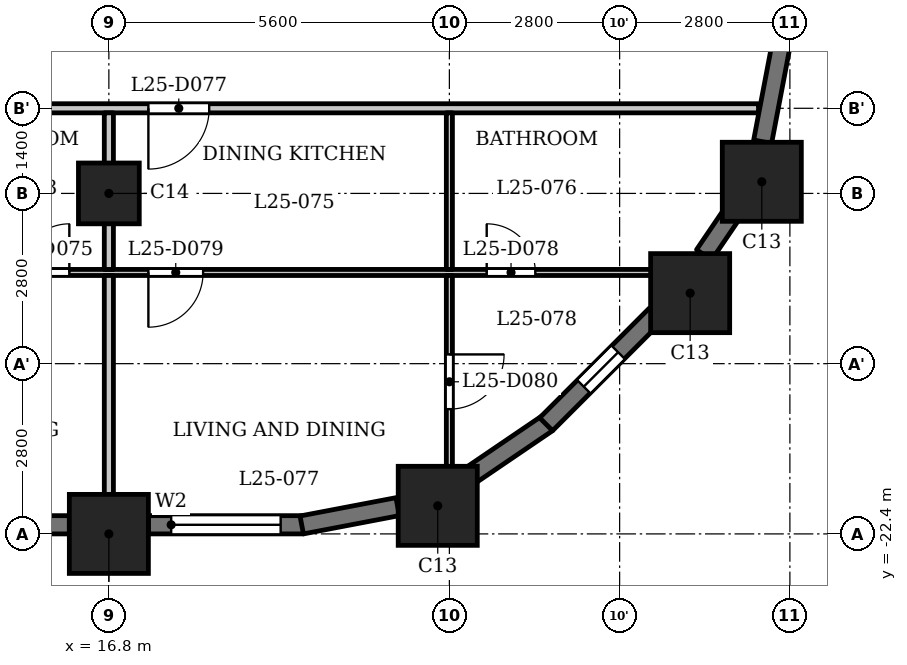
"""IFC4 building model, lengths in metres.
Left out: names, types, materials, properties, quantities, classifications, styles, units other than length and angle.
Written with IfcOpenShell. Run it as: python <this file> out.ifc"""

import sys

from ifc_helpers import new_model, si_unit, direction, frame, frame_2d, origin, origin_2d, place, context, subcontext, project, spatial, rectangle, extrude, element, fill, save


model = new_model("IFC4")
c1 = context("Model", 3, precision=1e-05, world=origin(), true_north=direction((0.0, 1.0)))
c2 = subcontext(c1, "Body", "Model", "MODEL_VIEW")
j1 = project(units=[si_unit("LENGTHUNIT", "METRE"), si_unit("PLANEANGLEUNIT", "RADIAN")], contexts=[c1])
p1 = place(None, origin())
s1 = spatial("IfcSite", under=j1, at=p1, CompositionType="ELEMENT")
p2 = place(p1, origin())
s2 = spatial("IfcBuilding", under=s1, at=p2, CompositionType="ELEMENT")
p3 = place(p2, frame((0.0, 0.0, 100.8)))
s3 = spatial("IfcBuildingStorey", under=s2, at=p3, CompositionType="ELEMENT", Elevation=100.8)
for number, where, z_axis, x_axis in (
    (1, (16.8, -22.4, 0.0), (0.0, 0.0, 1.0), (1.0, 0.0, 0.0)),
    (2, (22.209, -21.938, 0.0), (0.0, 0.0, 1.0), (1.0, 0.0, 0.0)),
    (3, (26.36, -18.44, 0.0), (0.0, 0.0, 1.0), (1.0, 0.0, 0.0)),
    (4, (27.538, -16.609, 0.0), (0.0, 0.0, 1.0), (1.0, 0.0, 0.0)),
):
    element("IfcColumn", number, at=place(p3, frame(where, z_axis=z_axis, x_axis=x_axis)), inside=s3, PredefinedType="COLUMN", context=c2, shape_type="SweptSolid", body=[
        extrude(rectangle(XDim=1.3, YDim=1.3, at=origin_2d()), origin(), (0.0, 0.0, 1.0), 3.5),
    ])
p4 = place(p3, frame((16.8, -16.8, 0.0), z_axis=(0.0, 0.0, 1.0), x_axis=(1.0, 0.0, 0.0)))
e5 = element("IfcColumn", 5, at=p4, inside=s3, PredefinedType="COLUMN", context=c2, shape_type="SweptSolid", body=[
    extrude(rectangle(XDim=1.0, YDim=1.0, at=origin_2d()), origin(), (0.0, 0.0, 1.0), 3.5),
])
p5 = place(p3, frame((11.85, -22.25, 0.0), z_axis=(0.0, 0.0, 1.0), x_axis=(1.0, 0.0, 0.0)))
e6 = element("IfcWall", 6, at=p5, inside=s3, PredefinedType="SOLIDWALL", context=c2, shape_type="SweptSolid", body=[
    extrude(rectangle(XDim=4.3, YDim=0.3, at=frame_2d((2.15, 0.0))), origin(), (0.0, 0.0, 1.0), 2.4),
])
p6 = place(p5, frame((0.35, 0.0, 1.2)))
e7 = element("IfcOpeningElement", 7, at=p6, cuts=e6, PredefinedType="OPENING", context=c2, shape_type="SweptSolid", body=[
    extrude(rectangle(XDim=3.6, YDim=0.95, at=frame_2d((1.8, 0.475))), frame((0.0, 0.16, 0.0), z_axis=(0.0, -1.0, 0.0), x_axis=(1.0, 0.0, 0.0)), (0.0, 0.0, 1.0), 0.32),
])
p7 = place(p3, frame((17.45, -22.25, 0.0), z_axis=(0.0, 0.0, 1.0), x_axis=(1.0, 0.0, 0.0)))
e8 = element("IfcWall", 8, at=p7, inside=s3, PredefinedType="SOLIDWALL", context=c2, shape_type="SweptSolid", body=[
    extrude(rectangle(XDim=2.55, YDim=0.3, at=frame_2d((1.275, 0.0))), origin(), (0.0, 0.0, 1.0), 2.4),
])
p8 = place(p7, frame((0.375, 0.0, 0.9)))
e9 = element("IfcOpeningElement", 9, at=p8, cuts=e8, PredefinedType="OPENING", context=c2, shape_type="SweptSolid", body=[
    extrude(rectangle(XDim=1.8, YDim=1.25, at=frame_2d((0.9, 0.625))), frame((0.0, 0.16, 0.0), z_axis=(0.0, -1.0, 0.0), x_axis=(1.0, 0.0, 0.0)), (0.0, 0.0, 1.0), 0.32),
])
for number, where, z_axis, x_axis in (
    (10, (19.972, -22.253, 0.0), (0.0, 0.0, 1.0), (0.982, 0.187, 0.0)),
    (11, (22.684, -21.482, 0.0), (0.0, 0.0, 1.0), (0.827, 0.562, 0.0)),
):
    element("IfcWall", number, at=place(p3, frame(where, z_axis=z_axis, x_axis=x_axis)), inside=s3, PredefinedType="SOLIDWALL", context=c2, shape_type="SweptSolid", body=[
        extrude(rectangle(XDim=1.606, YDim=0.3, at=frame_2d((0.803, 0.0))), origin(), (0.0, 0.0, 1.0), 2.4),
    ])
p9 = place(p3, frame((23.991, -20.597, 0.0), z_axis=(0.0, 0.0, 1.0), x_axis=(0.707106781187, 0.707106781187, 0.0)))
e12 = element("IfcWall", 12, at=p9, inside=s3, PredefinedType="SOLIDWALL", context=c2, shape_type="SweptSolid", body=[
    extrude(rectangle(XDim=2.55, YDim=0.3, at=frame_2d((1.275, 0.0))), origin(), (0.0, 0.0, 1.0), 2.4),
])
p10 = place(p9, frame((0.875, 0.0, 0.6)))
e13 = element("IfcOpeningElement", 13, at=p10, cuts=e12, PredefinedType="OPENING", context=c2, shape_type="SweptSolid", body=[
    extrude(rectangle(XDim=0.8, YDim=1.55, at=frame_2d((0.4, 0.775))), frame((0.0, 0.16, 0.0), z_axis=(0.0, -1.0, 0.0), x_axis=(1.0, 0.0, 0.0)), (0.0, 0.0, 1.0), 0.32),
])
p11 = place(p3, frame((26.589, -17.81, 0.0), z_axis=(0.0, 0.0, 1.0), x_axis=(0.562066330934, 0.827092159091, 0.0)))
e14 = element("IfcWall", 14, at=p11, inside=s3, PredefinedType="SOLIDWALL", context=c2, shape_type="SweptSolid", body=[
    extrude(rectangle(XDim=0.877, YDim=0.3, at=frame_2d((0.438, 0.0))), origin(), (0.0, 0.0, 1.0), 3.2),
])
p12 = place(p3, frame((27.552, -15.949, 0.0), z_axis=(0.0, 0.0, 1.0), x_axis=(0.187279751651, 0.982306619453, 0.0)))
e15 = element("IfcWall", 15, at=p12, inside=s3, PredefinedType="SOLIDWALL", context=c2, shape_type="SweptSolid", body=[
    extrude(rectangle(XDim=1.606, YDim=0.3, at=frame_2d((0.803, 0.0))), origin(), (0.0, 0.0, 1.0), 2.4),
])
p13 = place(p3, frame((-26.19, -18.1, 0.0), z_axis=(0.0, 0.0, 1.0), x_axis=(1.0, 0.0, 0.0)))
e16 = element("IfcWall", 16, at=p13, inside=s3, PredefinedType="PARTITIONING", context=c2, shape_type="SweptSolid", body=[
    extrude(rectangle(XDim=52.63, YDim=0.1, at=frame_2d((26.315, 0.0))), origin(), (0.0, 0.0, 1.0), 3.2),
])
p14 = place(p13, frame((1.09, 0.0, 0.0)))
e17 = element("IfcOpeningElement", 17, at=p14, cuts=e16, PredefinedType="OPENING", context=c2, shape_type="SweptSolid", body=[
    extrude(rectangle(XDim=0.8, YDim=2.1, at=frame_2d((0.4, 1.05))), frame((0.0, 0.06, 0.0), z_axis=(0.0, -1.0, 0.0), x_axis=(1.0, 0.0, 0.0)), (0.0, 0.0, 1.0), 0.12),
])
p15 = place(p13, frame((4.44, 0.0, 0.0)))
e18 = element("IfcOpeningElement", 18, at=p15, cuts=e16, PredefinedType="OPENING", context=c2, shape_type="SweptSolid", body=[
    extrude(rectangle(XDim=0.9, YDim=2.1, at=frame_2d((0.45, 1.05))), frame((0.0, 0.06, 0.0), z_axis=(0.0, -1.0, 0.0), x_axis=(1.0, 0.0, 0.0)), (0.0, 0.0, 1.0), 0.12),
])
p16 = place(p13, frame((10.04, 0.0, 0.0)))
e19 = element("IfcOpeningElement", 19, at=p16, cuts=e16, PredefinedType="OPENING", context=c2, shape_type="SweptSolid", body=[
    extrude(rectangle(XDim=0.8, YDim=2.1, at=frame_2d((0.4, 1.05))), frame((0.0, 0.06, 0.0), z_axis=(0.0, -1.0, 0.0), x_axis=(1.0, 0.0, 0.0)), (0.0, 0.0, 1.0), 0.12),
])
p17 = place(p13, frame((15.64, 0.0, 0.0)))
e20 = element("IfcOpeningElement", 20, at=p17, cuts=e16, PredefinedType="OPENING", context=c2, shape_type="SweptSolid", body=[
    extrude(rectangle(XDim=0.9, YDim=2.1, at=frame_2d((0.45, 1.05))), frame((0.0, 0.06, 0.0), z_axis=(0.0, -1.0, 0.0), x_axis=(1.0, 0.0, 0.0)), (0.0, 0.0, 1.0), 0.12),
])
p18 = place(p13, frame((24.74, 0.0, 0.0)))
e21 = element("IfcOpeningElement", 21, at=p18, cuts=e16, PredefinedType="OPENING", context=c2, shape_type="SweptSolid", body=[
    extrude(rectangle(XDim=0.8, YDim=2.1, at=frame_2d((0.4, 1.05))), frame((0.0, 0.06, 0.0), z_axis=(0.0, -1.0, 0.0), x_axis=(1.0, 0.0, 0.0)), (0.0, 0.0, 1.0), 0.12),
])
p19 = place(p13, frame((21.24, 0.0, 0.0)))
e22 = element("IfcOpeningElement", 22, at=p19, cuts=e16, PredefinedType="OPENING", context=c2, shape_type="SweptSolid", body=[
    extrude(rectangle(XDim=0.9, YDim=2.1, at=frame_2d((0.45, 1.05))), frame((0.0, 0.06, 0.0), z_axis=(0.0, -1.0, 0.0), x_axis=(1.0, 0.0, 0.0)), (0.0, 0.0, 1.0), 0.12),
])
p20 = place(p13, frame((35.94, 0.0, 0.0)))
e23 = element("IfcOpeningElement", 23, at=p20, cuts=e16, PredefinedType="OPENING", context=c2, shape_type="SweptSolid", body=[
    extrude(rectangle(XDim=0.8, YDim=2.1, at=frame_2d((0.4, 1.05))), frame((0.0, 0.06, 0.0), z_axis=(0.0, -1.0, 0.0), x_axis=(1.0, 0.0, 0.0)), (0.0, 0.0, 1.0), 0.12),
])
p21 = place(p13, frame((33.19, 0.0, 0.0)))
e24 = element("IfcOpeningElement", 24, at=p21, cuts=e16, PredefinedType="OPENING", context=c2, shape_type="SweptSolid", body=[
    extrude(rectangle(XDim=0.9, YDim=2.1, at=frame_2d((0.45, 1.05))), frame((0.0, 0.06, 0.0), z_axis=(0.0, -1.0, 0.0), x_axis=(1.0, 0.0, 0.0)), (0.0, 0.0, 1.0), 0.12),
])
p22 = place(p13, frame((27.59, 0.0, 0.0)))
e25 = element("IfcOpeningElement", 25, at=p22, cuts=e16, PredefinedType="OPENING", context=c2, shape_type="SweptSolid", body=[
    extrude(rectangle(XDim=0.9, YDim=2.1, at=frame_2d((0.45, 1.05))), frame((0.0, 0.06, 0.0), z_axis=(0.0, -1.0, 0.0), x_axis=(1.0, 0.0, 0.0)), (0.0, 0.0, 1.0), 0.12),
])
p23 = place(p13, frame((29.64, 0.0, 0.0)))
e26 = element("IfcOpeningElement", 26, at=p23, cuts=e16, PredefinedType="OPENING", context=c2, shape_type="SweptSolid", body=[
    extrude(rectangle(XDim=0.9, YDim=2.1, at=frame_2d((0.45, 1.05))), frame((0.0, 0.06, 0.0), z_axis=(0.0, -1.0, 0.0), x_axis=(1.0, 0.0, 0.0)), (0.0, 0.0, 1.0), 0.12),
])
p24 = place(p13, frame((41.54, 0.0, 0.0)))
e27 = element("IfcOpeningElement", 27, at=p24, cuts=e16, PredefinedType="OPENING", context=c2, shape_type="SweptSolid", body=[
    extrude(rectangle(XDim=0.8, YDim=2.1, at=frame_2d((0.4, 1.05))), frame((0.0, 0.06, 0.0), z_axis=(0.0, -1.0, 0.0), x_axis=(1.0, 0.0, 0.0)), (0.0, 0.0, 1.0), 0.12),
])
p25 = place(p13, frame((38.54, 0.0, 0.0)))
e28 = element("IfcOpeningElement", 28, at=p25, cuts=e16, PredefinedType="OPENING", context=c2, shape_type="SweptSolid", body=[
    extrude(rectangle(XDim=0.9, YDim=2.1, at=frame_2d((0.45, 1.05))), frame((0.0, 0.06, 0.0), z_axis=(0.0, -1.0, 0.0), x_axis=(1.0, 0.0, 0.0)), (0.0, 0.0, 1.0), 0.12),
])
p26 = place(p13, frame((49.204, 0.0, 0.0)))
e29 = element("IfcOpeningElement", 29, at=p26, cuts=e16, PredefinedType="OPENING", context=c2, shape_type="SweptSolid", body=[
    extrude(rectangle(XDim=0.8, YDim=2.1, at=frame_2d((0.4, 1.05))), frame((0.0, 0.06, 0.0), z_axis=(0.0, -1.0, 0.0), x_axis=(1.0, 0.0, 0.0)), (0.0, 0.0, 1.0), 0.12),
])
p27 = place(p13, frame((43.64, 0.0, 0.0)))
e30 = element("IfcOpeningElement", 30, at=p27, cuts=e16, PredefinedType="OPENING", context=c2, shape_type="SweptSolid", body=[
    extrude(rectangle(XDim=0.9, YDim=2.1, at=frame_2d((0.45, 1.05))), frame((0.0, 0.06, 0.0), z_axis=(0.0, -1.0, 0.0), x_axis=(1.0, 0.0, 0.0)), (0.0, 0.0, 1.0), 0.12),
])
p28 = place(p3, frame((-27.484, -15.4, 0.0), z_axis=(0.0, 0.0, 1.0), x_axis=(1.0, 0.0, 0.0)))
e31 = element("IfcWall", 31, at=p28, inside=s3, PredefinedType="PARTITIONING", context=c2, shape_type="SweptSolid", body=[
    extrude(rectangle(XDim=54.968, YDim=0.15, at=frame_2d((27.484, 0.0))), origin(), (0.0, 0.0, 1.0), 3.2),
])
p29 = place(p28, frame((5.734, 0.0, 0.0)))
e32 = element("IfcOpeningElement", 32, at=p29, cuts=e31, PredefinedType="OPENING", context=c2, shape_type="SweptSolid", body=[
    extrude(rectangle(XDim=1.0, YDim=2.1, at=frame_2d((0.5, 1.05))), frame((0.0, 0.085, 0.0), z_axis=(0.0, -1.0, 0.0), x_axis=(1.0, 0.0, 0.0)), (0.0, 0.0, 1.0), 0.17),
])
p30 = place(p28, frame((16.934, 0.0, 0.0)))
e33 = element("IfcOpeningElement", 33, at=p30, cuts=e31, PredefinedType="OPENING", context=c2, shape_type="SweptSolid", body=[
    extrude(rectangle(XDim=1.0, YDim=2.1, at=frame_2d((0.5, 1.05))), frame((0.0, 0.085, 0.0), z_axis=(0.0, -1.0, 0.0), x_axis=(1.0, 0.0, 0.0)), (0.0, 0.0, 1.0), 0.17),
])
p31 = place(p28, frame((22.534, 0.0, 0.0)))
e34 = element("IfcOpeningElement", 34, at=p31, cuts=e31, PredefinedType="OPENING", context=c2, shape_type="SweptSolid", body=[
    extrude(rectangle(XDim=1.0, YDim=2.1, at=frame_2d((0.5, 1.05))), frame((0.0, 0.085, 0.0), z_axis=(0.0, -1.0, 0.0), x_axis=(1.0, 0.0, 0.0)), (0.0, 0.0, 1.0), 0.17),
])
p32 = place(p28, frame((31.384, 0.0, 0.0)))
e35 = element("IfcOpeningElement", 35, at=p32, cuts=e31, PredefinedType="OPENING", context=c2, shape_type="SweptSolid", body=[
    extrude(rectangle(XDim=1.0, YDim=2.1, at=frame_2d((0.5, 1.05))), frame((0.0, 0.085, 0.0), z_axis=(0.0, -1.0, 0.0), x_axis=(1.0, 0.0, 0.0)), (0.0, 0.0, 1.0), 0.17),
])
p33 = place(p28, frame((39.584, 0.0, 0.0)))
e36 = element("IfcOpeningElement", 36, at=p33, cuts=e31, PredefinedType="OPENING", context=c2, shape_type="SweptSolid", body=[
    extrude(rectangle(XDim=1.0, YDim=2.1, at=frame_2d((0.5, 1.05))), frame((0.0, 0.085, 0.0), z_axis=(0.0, -1.0, 0.0), x_axis=(1.0, 0.0, 0.0)), (0.0, 0.0, 1.0), 0.17),
])
p34 = place(p28, frame((44.934, 0.0, 0.0)))
e37 = element("IfcOpeningElement", 37, at=p34, cuts=e31, PredefinedType="OPENING", context=c2, shape_type="SweptSolid", body=[
    extrude(rectangle(XDim=1.0, YDim=2.1, at=frame_2d((0.5, 1.05))), frame((0.0, 0.085, 0.0), z_axis=(0.0, -1.0, 0.0), x_axis=(1.0, 0.0, 0.0)), (0.0, 0.0, 1.0), 0.17),
])
p35 = place(p3, frame((16.8, -23.03, 0.0), z_axis=(0.0, 0.0, 1.0), x_axis=(0.0, 1.0, 0.0)))
e38 = element("IfcWall", 38, at=p35, inside=s3, PredefinedType="PARTITIONING", context=c2, shape_type="SweptSolid", body=[
    extrude(rectangle(XDim=4.88, YDim=0.15, at=frame_2d((2.44, 0.0))), origin(), (0.0, 0.0, 1.0), 3.2),
])
p36 = place(p3, frame((16.8, -18.05, 0.0), z_axis=(0.0, 0.0, 1.0), x_axis=(0.0, 1.0, 0.0)))
e39 = element("IfcWall", 39, at=p36, inside=s3, PredefinedType="PARTITIONING", context=c2, shape_type="SweptSolid", body=[
    extrude(rectangle(XDim=2.575, YDim=0.15, at=frame_2d((1.288, 0.0))), origin(), (0.0, 0.0, 1.0), 3.2),
])
p37 = place(p3, frame((22.4, -21.72, 0.0), z_axis=(0.0, 0.0, 1.0), x_axis=(0.0, 1.0, 0.0)))
e40 = element("IfcWall", 40, at=p37, inside=s3, PredefinedType="PARTITIONING", context=c2, shape_type="SweptSolid", body=[
    extrude(rectangle(XDim=3.57, YDim=0.1, at=frame_2d((1.785, 0.0))), origin(), (0.0, 0.0, 1.0), 3.2),
])
p38 = place(p37, frame((1.372, 0.0, 0.0)))
e41 = element("IfcOpeningElement", 41, at=p38, cuts=e40, PredefinedType="OPENING", context=c2, shape_type="SweptSolid", body=[
    extrude(rectangle(XDim=0.9, YDim=2.1, at=frame_2d((0.45, 1.05))), frame((0.0, 0.06, 0.0), z_axis=(0.0, -1.0, 0.0), x_axis=(1.0, 0.0, 0.0)), (0.0, 0.0, 1.0), 0.12),
])
p39 = place(p3, frame((22.4, -18.05, 0.0), z_axis=(0.0, 0.0, 1.0), x_axis=(0.0, 1.0, 0.0)))
e42 = element("IfcWall", 42, at=p39, inside=s3, PredefinedType="PARTITIONING", context=c2, shape_type="SweptSolid", body=[
    extrude(rectangle(XDim=2.575, YDim=0.1, at=frame_2d((1.288, 0.0))), origin(), (0.0, 0.0, 1.0), 3.2),
])
p40 = place(p24, origin())
e43 = element("IfcDoor", 43, at=p40, inside=s3, OperationType="SINGLE_SWING_LEFT", PredefinedType="DOOR", context=c2, shape_type="SweptSolid", body=[
    extrude(rectangle(XDim=0.8, YDim=2.1, at=frame_2d((0.4, 1.05))), frame((0.0, 0.025, 0.0), z_axis=(0.0, -1.0, 0.0), x_axis=(1.0, 0.0, 0.0)), (0.0, 0.0, 1.0), 0.05),
])
fill(e27, e43)
p41 = place(p34, origin())
e44 = element("IfcDoor", 44, at=p41, inside=s3, OperationType="SINGLE_SWING_LEFT", PredefinedType="DOOR", context=c2, shape_type="SweptSolid", body=[
    extrude(rectangle(XDim=1.0, YDim=2.1, at=frame_2d((0.5, 1.05))), frame((0.0, 0.025, 0.0), z_axis=(0.0, -1.0, 0.0), x_axis=(1.0, 0.0, 0.0)), (0.0, 0.0, 1.0), 0.05),
])
fill(e37, e44)
p42 = place(p26, origin())
e45 = element("IfcDoor", 45, at=p42, inside=s3, OperationType="SINGLE_SWING_RIGHT", PredefinedType="DOOR", context=c2, shape_type="SweptSolid", body=[
    extrude(rectangle(XDim=0.8, YDim=2.1, at=frame_2d((0.4, 1.05))), frame((0.0, 0.025, 0.0), z_axis=(0.0, -1.0, 0.0), x_axis=(1.0, 0.0, 0.0)), (0.0, 0.0, 1.0), 0.05),
])
fill(e29, e45)
p43 = place(p27, origin())
e46 = element("IfcDoor", 46, at=p43, inside=s3, OperationType="SINGLE_SWING_LEFT", PredefinedType="DOOR", context=c2, shape_type="SweptSolid", body=[
    extrude(rectangle(XDim=0.9, YDim=2.1, at=frame_2d((0.45, 1.05))), frame((0.0, 0.025, 0.0), z_axis=(0.0, -1.0, 0.0), x_axis=(1.0, 0.0, 0.0)), (0.0, 0.0, 1.0), 0.05),
])
fill(e30, e46)
p44 = place(p38, origin())
e47 = element("IfcDoor", 47, at=p44, inside=s3, OperationType="SINGLE_SWING_RIGHT", PredefinedType="DOOR", context=c2, shape_type="SweptSolid", body=[
    extrude(rectangle(XDim=0.9, YDim=2.1, at=frame_2d((0.45, 1.05))), frame((0.0, 0.025, 0.0), z_axis=(0.0, -1.0, 0.0), x_axis=(1.0, 0.0, 0.0)), (0.0, 0.0, 1.0), 0.05),
])
fill(e41, e47)
p45 = place(p8, origin())
e48 = element("IfcWindow", 48, at=p45, inside=s3, PartitioningType="SINGLE_PANEL", PredefinedType="WINDOW", context=c2, shape_type="SweptSolid", body=[
    extrude(rectangle(XDim=1.8, YDim=1.25, at=frame_2d((0.9, 0.625))), frame((0.0, 0.03, 0.0), z_axis=(0.0, -1.0, 0.0), x_axis=(1.0, 0.0, 0.0)), (0.0, 0.0, 1.0), 0.06),
])
fill(e9, e48)
p46 = place(p10, origin())
e49 = element("IfcWindow", 49, at=p46, inside=s3, PartitioningType="SINGLE_PANEL", PredefinedType="WINDOW", context=c2, shape_type="SweptSolid", body=[
    extrude(rectangle(XDim=0.8, YDim=1.55, at=frame_2d((0.4, 0.775))), frame((0.0, 0.03, 0.0), z_axis=(0.0, -1.0, 0.0), x_axis=(1.0, 0.0, 0.0)), (0.0, 0.0, 1.0), 0.06),
])
fill(e13, e49)
save(model, sys.argv[1])
